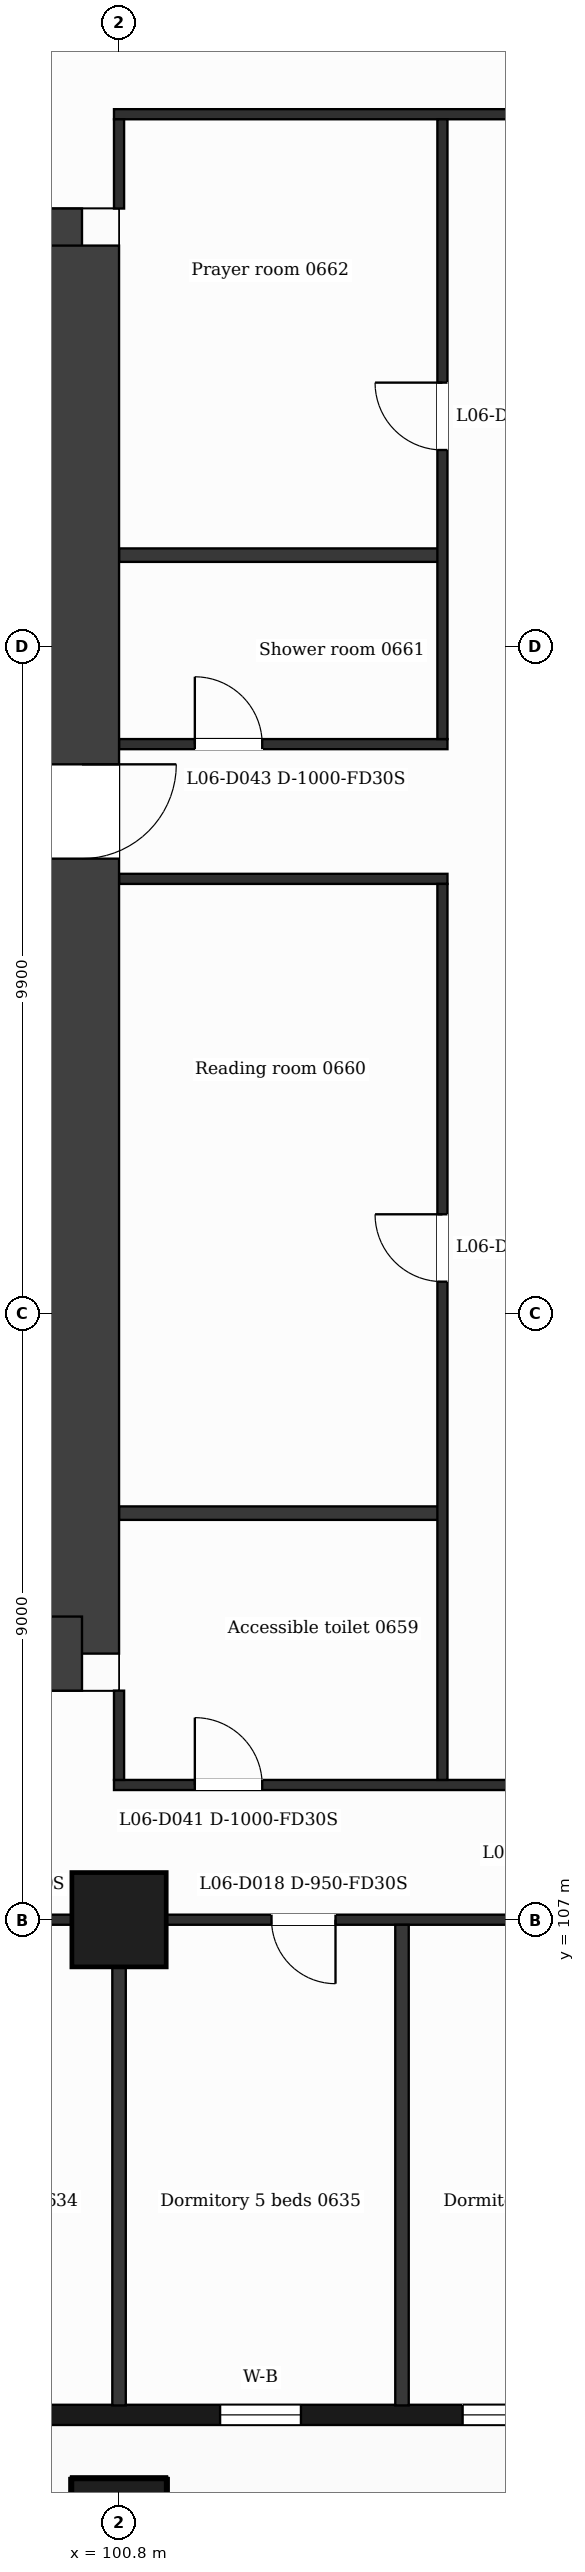
"""IFC4 building model, lengths in metres.
Left out: names, types, materials, properties, quantities, classifications, styles, units other than length and angle.
Written with IfcOpenShell. Run it as: python <this file> out.ifc"""

import sys

from ifc_helpers import new_model, si_unit, direction, frame, frame_2d, origin, origin_2d, place, context, subcontext, project, spatial, rectangle, extrude, element, fill, save


model = new_model("IFC4")
c1 = context("Model", 3, precision=1e-05, world=origin(), true_north=direction((0.0, 1.0)))
c2 = subcontext(c1, "Body", "Model", "MODEL_VIEW")
j1 = project(units=[si_unit("LENGTHUNIT", "METRE"), si_unit("PLANEANGLEUNIT", "RADIAN")], contexts=[c1])
p1 = place(None, origin())
s1 = spatial("IfcSite", under=j1, at=p1, CompositionType="ELEMENT")
p2 = place(p1, origin())
s2 = spatial("IfcBuilding", under=s1, at=p2, CompositionType="ELEMENT")
p3 = place(p2, frame((0.0, 0.0, 39.0)))
s3 = spatial("IfcBuildingStorey", under=s2, at=p3, CompositionType="ELEMENT", Elevation=39.0)
p4 = place(p3, frame((89.112, 131.85, 0.0), z_axis=(0.0, 0.0, 1.0), x_axis=(1.0, 0.0, 0.0)))
e1 = element("IfcWall", 1, at=p4, inside=s3, PredefinedType="SHEAR", context=c2, shape_type="SweptSolid", body=[
    extrude(rectangle(XDim=11.138, YDim=1.1, at=frame_2d((5.569, 0.0))), origin(), (0.0, 0.0, 1.0), 3.5),
])
p5 = place(p4, frame((6.552, 0.0, 0.0)))
e2 = element("IfcOpeningElement", 2, at=p5, cuts=e1, PredefinedType="OPENING", context=c2, shape_type="SweptSolid", body=[
    extrude(rectangle(XDim=1.2, YDim=2.1, at=frame_2d((0.6, 1.05))), frame((0.0, 0.56, 0.0), z_axis=(0.0, -1.0, 0.0), x_axis=(1.0, 0.0, 0.0)), (0.0, 0.0, 1.0), 1.12),
])
p6 = place(p3, frame((100.25, 131.85, 0.0), z_axis=(0.0, 0.0, 1.0), x_axis=(0.0, -1.0, 0.0)))
e3 = element("IfcWall", 3, at=p6, inside=s3, PredefinedType="SHEAR", context=c2, shape_type="SweptSolid", body=[
    extrude(rectangle(XDim=20.9, YDim=1.1, at=frame_2d((10.45, 0.0))), origin(), (0.0, 0.0, 1.0), 3.5),
])
p7 = place(p6, frame((7.7, 0.0, 0.0)))
e4 = element("IfcOpeningElement", 4, at=p7, cuts=e3, PredefinedType="OPENING", context=c2, shape_type="SweptSolid", body=[
    extrude(rectangle(XDim=1.4, YDim=2.1, at=frame_2d((0.7, 1.05))), frame((0.0, 0.56, 0.0), z_axis=(0.0, -1.0, 0.0), x_axis=(1.0, 0.0, 0.0)), (0.0, 0.0, 1.0), 1.12),
])
p8 = place(p3, frame((100.25, 110.95, 0.0), z_axis=(0.0, 0.0, 1.0), x_axis=(-1.0, 0.0, 0.0)))
e5 = element("IfcWall", 5, at=p8, inside=s3, PredefinedType="SHEAR", context=c2, shape_type="SweptSolid", body=[
    extrude(rectangle(XDim=13.952, YDim=1.1, at=frame_2d((6.976, 0.0))), origin(), (0.0, 0.0, 1.0), 3.5),
])
p9 = place(p8, frame((5.748, 0.0, 0.0)))
e6 = element("IfcOpeningElement", 6, at=p9, cuts=e5, PredefinedType="OPENING", context=c2, shape_type="SweptSolid", body=[
    extrude(rectangle(XDim=1.4, YDim=2.1, at=frame_2d((0.7, 1.05))), frame((0.0, 0.56, 0.0), z_axis=(0.0, -1.0, 0.0), x_axis=(1.0, 0.0, 0.0)), (0.0, 0.0, 1.0), 1.12),
])
for number, where, z_axis, x_axis in (
    (7, (100.8, 98.0, -0.32), (0.0, 0.0, 1.0), (1.0, 0.0, 0.0)),
    (8, (100.8, 107.0, -0.32), (0.0, 0.0, 1.0), (1.0, 0.0, 0.0)),
):
    element("IfcColumn", number, at=place(p3, frame(where, z_axis=z_axis, x_axis=x_axis)), inside=s3, PredefinedType="COLUMN", context=c2, shape_type="SweptSolid", body=[
        extrude(rectangle(XDim=1.4, YDim=1.4, at=origin_2d()), origin(), (0.0, 0.0, 1.0), 3.82),
    ])
p10 = place(p3, frame((89.85, 99.65, 0.0), z_axis=(0.0, 0.0, 1.0), x_axis=(1.0, 0.0, 0.0)))
e9 = element("IfcWall", 9, at=p10, inside=s3, PredefinedType="SOLIDWALL", context=c2, shape_type="SweptSolid", body=[
    extrude(rectangle(XDim=47.25, YDim=0.3, at=frame_2d((23.625, 0.0))), origin(), (0.0, 0.0, 1.0), 3.18),
])
p11 = place(p10, frame((0.725, 0.0, 0.9)))
e10 = element("IfcOpeningElement", 10, at=p11, cuts=e9, PredefinedType="OPENING", context=c2, shape_type="SweptSolid", body=[
    extrude(rectangle(XDim=1.2, YDim=2.1, at=frame_2d((0.6, 1.05))), frame((0.0, 0.16, 0.0), z_axis=(0.0, -1.0, 0.0), x_axis=(1.0, 0.0, 0.0)), (0.0, 0.0, 1.0), 0.32),
])
p12 = place(p10, frame((3.45, 0.0, 0.9)))
e11 = element("IfcOpeningElement", 11, at=p12, cuts=e9, PredefinedType="OPENING", context=c2, shape_type="SweptSolid", body=[
    extrude(rectangle(XDim=2.4, YDim=2.1, at=frame_2d((1.2, 1.05))), frame((0.0, 0.16, 0.0), z_axis=(0.0, -1.0, 0.0), x_axis=(1.0, 0.0, 0.0)), (0.0, 0.0, 1.0), 0.32),
])
p13 = place(p10, frame((8.25, 0.0, 0.9)))
e12 = element("IfcOpeningElement", 12, at=p13, cuts=e9, PredefinedType="OPENING", context=c2, shape_type="SweptSolid", body=[
    extrude(rectangle(XDim=1.2, YDim=2.1, at=frame_2d((0.6, 1.05))), frame((0.0, 0.16, 0.0), z_axis=(0.0, -1.0, 0.0), x_axis=(1.0, 0.0, 0.0)), (0.0, 0.0, 1.0), 0.32),
])
p14 = place(p10, frame((12.45, 0.0, 0.9)))
e13 = element("IfcOpeningElement", 13, at=p14, cuts=e9, PredefinedType="OPENING", context=c2, shape_type="SweptSolid", body=[
    extrude(rectangle(XDim=1.2, YDim=2.1, at=frame_2d((0.6, 1.05))), frame((0.0, 0.16, 0.0), z_axis=(0.0, -1.0, 0.0), x_axis=(1.0, 0.0, 0.0)), (0.0, 0.0, 1.0), 0.32),
])
p15 = place(p10, frame((16.05, 0.0, 0.9)))
e14 = element("IfcOpeningElement", 14, at=p15, cuts=e9, PredefinedType="OPENING", context=c2, shape_type="SweptSolid", body=[
    extrude(rectangle(XDim=2.4, YDim=2.1, at=frame_2d((1.2, 1.05))), frame((0.0, 0.16, 0.0), z_axis=(0.0, -1.0, 0.0), x_axis=(1.0, 0.0, 0.0)), (0.0, 0.0, 1.0), 0.32),
])
p16 = place(p10, frame((20.25, 0.0, 0.9)))
e15 = element("IfcOpeningElement", 15, at=p16, cuts=e9, PredefinedType="OPENING", context=c2, shape_type="SweptSolid", body=[
    extrude(rectangle(XDim=2.4, YDim=2.1, at=frame_2d((1.2, 1.05))), frame((0.0, 0.16, 0.0), z_axis=(0.0, -1.0, 0.0), x_axis=(1.0, 0.0, 0.0)), (0.0, 0.0, 1.0), 0.32),
])
p17 = place(p10, frame((25.05, 0.0, 0.0)))
e16 = element("IfcOpeningElement", 16, at=p17, cuts=e9, PredefinedType="OPENING", context=c2, shape_type="SweptSolid", body=[
    extrude(rectangle(XDim=1.2, YDim=2.4, at=frame_2d((0.6, 1.2))), frame((0.0, 0.16, 0.0), z_axis=(0.0, -1.0, 0.0), x_axis=(1.0, 0.0, 0.0)), (0.0, 0.0, 1.0), 0.32),
])
p18 = place(p10, frame((28.65, 0.0, 0.9)))
e17 = element("IfcOpeningElement", 17, at=p18, cuts=e9, PredefinedType="OPENING", context=c2, shape_type="SweptSolid", body=[
    extrude(rectangle(XDim=2.4, YDim=2.1, at=frame_2d((1.2, 1.05))), frame((0.0, 0.16, 0.0), z_axis=(0.0, -1.0, 0.0), x_axis=(1.0, 0.0, 0.0)), (0.0, 0.0, 1.0), 0.32),
])
p19 = place(p10, frame((32.85, 0.0, 0.9)))
e18 = element("IfcOpeningElement", 18, at=p19, cuts=e9, PredefinedType="OPENING", context=c2, shape_type="SweptSolid", body=[
    extrude(rectangle(XDim=2.4, YDim=2.1, at=frame_2d((1.2, 1.05))), frame((0.0, 0.16, 0.0), z_axis=(0.0, -1.0, 0.0), x_axis=(1.0, 0.0, 0.0)), (0.0, 0.0, 1.0), 0.32),
])
p20 = place(p10, frame((37.65, 0.0, 0.9)))
e19 = element("IfcOpeningElement", 19, at=p20, cuts=e9, PredefinedType="OPENING", context=c2, shape_type="SweptSolid", body=[
    extrude(rectangle(XDim=1.2, YDim=2.1, at=frame_2d((0.6, 1.05))), frame((0.0, 0.16, 0.0), z_axis=(0.0, -1.0, 0.0), x_axis=(1.0, 0.0, 0.0)), (0.0, 0.0, 1.0), 0.32),
])
p21 = place(p10, frame((41.85, 0.0, 0.9)))
e20 = element("IfcOpeningElement", 20, at=p21, cuts=e9, PredefinedType="OPENING", context=c2, shape_type="SweptSolid", body=[
    extrude(rectangle(XDim=1.2, YDim=2.1, at=frame_2d((0.6, 1.05))), frame((0.0, 0.16, 0.0), z_axis=(0.0, -1.0, 0.0), x_axis=(1.0, 0.0, 0.0)), (0.0, 0.0, 1.0), 0.32),
])
p22 = place(p10, frame((45.25, 0.0, 0.9)))
e21 = element("IfcOpeningElement", 21, at=p22, cuts=e9, PredefinedType="OPENING", context=c2, shape_type="SweptSolid", body=[
    extrude(rectangle(XDim=1.2, YDim=2.1, at=frame_2d((0.6, 1.05))), frame((0.0, 0.16, 0.0), z_axis=(0.0, -1.0, 0.0), x_axis=(1.0, 0.0, 0.0)), (0.0, 0.0, 1.0), 0.32),
])
p23 = place(p3, frame((87.018, 107.0, 0.0), z_axis=(0.0, 0.0, 1.0), x_axis=(1.0, 0.0, 0.0)))
e22 = element("IfcWall", 22, at=p23, inside=s3, PredefinedType="PARTITIONING", context=c2, shape_type="SweptSolid", body=[
    extrude(rectangle(XDim=52.765, YDim=0.15, at=frame_2d((26.382, 0.0))), origin(), (0.0, 0.0, 1.0), 3.18),
])
p24 = place(p23, frame((1.032, 0.0, 0.0)))
e23 = element("IfcOpeningElement", 23, at=p24, cuts=e22, PredefinedType="OPENING", context=c2, shape_type="SweptSolid", body=[
    extrude(rectangle(XDim=0.95, YDim=2.1, at=frame_2d((0.475, 1.05))), frame((0.0, 0.085, 0.0), z_axis=(0.0, -1.0, 0.0), x_axis=(1.0, 0.0, 0.0)), (0.0, 0.0, 1.0), 0.17),
])
p25 = place(p23, frame((6.369, 0.0, 0.0)))
e24 = element("IfcOpeningElement", 24, at=p25, cuts=e22, PredefinedType="OPENING", context=c2, shape_type="SweptSolid", body=[
    extrude(rectangle(XDim=0.95, YDim=2.1, at=frame_2d((0.475, 1.05))), frame((0.0, 0.085, 0.0), z_axis=(0.0, -1.0, 0.0), x_axis=(1.0, 0.0, 0.0)), (0.0, 0.0, 1.0), 0.17),
])
p26 = place(p23, frame((10.952, 0.0, 0.0)))
e25 = element("IfcOpeningElement", 25, at=p26, cuts=e22, PredefinedType="OPENING", context=c2, shape_type="SweptSolid", body=[
    extrude(rectangle(XDim=0.95, YDim=2.1, at=frame_2d((0.475, 1.05))), frame((0.0, 0.085, 0.0), z_axis=(0.0, -1.0, 0.0), x_axis=(1.0, 0.0, 0.0)), (0.0, 0.0, 1.0), 0.17),
])
p27 = place(p23, frame((16.045, 0.0, 0.0)))
e26 = element("IfcOpeningElement", 26, at=p27, cuts=e22, PredefinedType="OPENING", context=c2, shape_type="SweptSolid", body=[
    extrude(rectangle(XDim=0.95, YDim=2.1, at=frame_2d((0.475, 1.05))), frame((0.0, 0.085, 0.0), z_axis=(0.0, -1.0, 0.0), x_axis=(1.0, 0.0, 0.0)), (0.0, 0.0, 1.0), 0.17),
])
p28 = place(p23, frame((20.245, 0.0, 0.0)))
e27 = element("IfcOpeningElement", 27, at=p28, cuts=e22, PredefinedType="OPENING", context=c2, shape_type="SweptSolid", body=[
    extrude(rectangle(XDim=0.95, YDim=2.1, at=frame_2d((0.475, 1.05))), frame((0.0, 0.085, 0.0), z_axis=(0.0, -1.0, 0.0), x_axis=(1.0, 0.0, 0.0)), (0.0, 0.0, 1.0), 0.17),
])
p29 = place(p23, frame((24.969, 0.0, 0.0)))
e28 = element("IfcOpeningElement", 28, at=p29, cuts=e22, PredefinedType="OPENING", context=c2, shape_type="SweptSolid", body=[
    extrude(rectangle(XDim=0.95, YDim=2.1, at=frame_2d((0.475, 1.05))), frame((0.0, 0.085, 0.0), z_axis=(0.0, -1.0, 0.0), x_axis=(1.0, 0.0, 0.0)), (0.0, 0.0, 1.0), 0.17),
])
p30 = place(p23, frame((26.807, 0.0, 0.0)))
e29 = element("IfcOpeningElement", 29, at=p30, cuts=e22, PredefinedType="OPENING", context=c2, shape_type="SweptSolid", body=[
    extrude(rectangle(XDim=0.95, YDim=2.1, at=frame_2d((0.475, 1.05))), frame((0.0, 0.085, 0.0), z_axis=(0.0, -1.0, 0.0), x_axis=(1.0, 0.0, 0.0)), (0.0, 0.0, 1.0), 0.17),
])
p31 = place(p23, frame((31.952, 0.0, 0.0)))
e30 = element("IfcOpeningElement", 30, at=p31, cuts=e22, PredefinedType="OPENING", context=c2, shape_type="SweptSolid", body=[
    extrude(rectangle(XDim=0.95, YDim=2.1, at=frame_2d((0.475, 1.05))), frame((0.0, 0.085, 0.0), z_axis=(0.0, -1.0, 0.0), x_axis=(1.0, 0.0, 0.0)), (0.0, 0.0, 1.0), 0.17),
])
p32 = place(p23, frame((40.795, 0.0, 0.0)))
e31 = element("IfcOpeningElement", 31, at=p32, cuts=e22, PredefinedType="OPENING", context=c2, shape_type="SweptSolid", body=[
    extrude(rectangle(XDim=0.95, YDim=2.1, at=frame_2d((0.475, 1.05))), frame((0.0, 0.085, 0.0), z_axis=(0.0, -1.0, 0.0), x_axis=(1.0, 0.0, 0.0)), (0.0, 0.0, 1.0), 0.17),
])
p33 = place(p23, frame((43.644, 0.0, 0.0)))
e32 = element("IfcOpeningElement", 32, at=p33, cuts=e22, PredefinedType="OPENING", context=c2, shape_type="SweptSolid", body=[
    extrude(rectangle(XDim=0.95, YDim=2.1, at=frame_2d((0.475, 1.05))), frame((0.0, 0.085, 0.0), z_axis=(0.0, -1.0, 0.0), x_axis=(1.0, 0.0, 0.0)), (0.0, 0.0, 1.0), 0.17),
])
p34 = place(p23, frame((48.767, 0.0, 0.0)))
e33 = element("IfcOpeningElement", 33, at=p34, cuts=e22, PredefinedType="OPENING", context=c2, shape_type="SweptSolid", body=[
    extrude(rectangle(XDim=0.95, YDim=2.1, at=frame_2d((0.475, 1.05))), frame((0.0, 0.085, 0.0), z_axis=(0.0, -1.0, 0.0), x_axis=(1.0, 0.0, 0.0)), (0.0, 0.0, 1.0), 0.17),
])
p35 = place(p3, frame((100.725, 109.0, 0.0), z_axis=(0.0, 0.0, 1.0), x_axis=(1.0, 0.0, 0.0)))
e34 = element("IfcWall", 34, at=p35, inside=s3, PredefinedType="PARTITIONING", context=c2, shape_type="SweptSolid", body=[
    extrude(rectangle(XDim=25.35, YDim=0.15, at=frame_2d((12.675, 0.0))), origin(), (0.0, 0.0, 1.0), 3.18),
])
p36 = place(p35, frame((1.2, 0.0, 0.0)))
e35 = element("IfcOpeningElement", 35, at=p36, cuts=e34, PredefinedType="OPENING", context=c2, shape_type="SweptSolid", body=[
    extrude(rectangle(XDim=1.0, YDim=2.1, at=frame_2d((0.5, 1.05))), frame((0.0, 0.085, 0.0), z_axis=(0.0, -1.0, 0.0), x_axis=(1.0, 0.0, 0.0)), (0.0, 0.0, 1.0), 0.17),
])
p37 = place(p35, frame((12.845, 0.0, 0.0)))
e36 = element("IfcOpeningElement", 36, at=p37, cuts=e34, PredefinedType="OPENING", context=c2, shape_type="SweptSolid", body=[
    extrude(rectangle(XDim=1.0, YDim=2.1, at=frame_2d((0.5, 1.05))), frame((0.0, 0.085, 0.0), z_axis=(0.0, -1.0, 0.0), x_axis=(1.0, 0.0, 0.0)), (0.0, 0.0, 1.0), 0.17),
])
p38 = place(p35, frame((23.15, 0.0, 0.0)))
e37 = element("IfcOpeningElement", 37, at=p38, cuts=e34, PredefinedType="OPENING", context=c2, shape_type="SweptSolid", body=[
    extrude(rectangle(XDim=1.0, YDim=2.1, at=frame_2d((0.5, 1.05))), frame((0.0, 0.085, 0.0), z_axis=(0.0, -1.0, 0.0), x_axis=(1.0, 0.0, 0.0)), (0.0, 0.0, 1.0), 0.17),
])
p39 = place(p3, frame((100.8, 113.035, 0.0), z_axis=(0.0, 0.0, 1.0), x_axis=(1.0, 0.0, 0.0)))
e38 = element("IfcWall", 38, at=p39, inside=s3, PredefinedType="PARTITIONING", context=c2, shape_type="SweptSolid", body=[
    extrude(rectangle(XDim=4.8, YDim=0.2, at=frame_2d((2.4, 0.0))), origin(), (0.0, 0.0, 1.0), 3.18),
])
p40 = place(p3, frame((100.8, 122.45, 0.0), z_axis=(0.0, 0.0, 1.0), x_axis=(1.0, 0.0, 0.0)))
e39 = element("IfcWall", 39, at=p40, inside=s3, PredefinedType="PARTITIONING", context=c2, shape_type="SweptSolid", body=[
    extrude(rectangle(XDim=4.875, YDim=0.15, at=frame_2d((2.438, 0.0))), origin(), (0.0, 0.0, 1.0), 3.18),
])
p41 = place(p3, frame((100.8, 124.45, 0.0), z_axis=(0.0, 0.0, 1.0), x_axis=(1.0, 0.0, 0.0)))
e40 = element("IfcWall", 40, at=p41, inside=s3, PredefinedType="PARTITIONING", context=c2, shape_type="SweptSolid", body=[
    extrude(rectangle(XDim=4.875, YDim=0.15, at=frame_2d((2.438, 0.0))), origin(), (0.0, 0.0, 1.0), 3.18),
])
p42 = place(p41, frame((1.125, 0.0, 0.0)))
e41 = element("IfcOpeningElement", 41, at=p42, cuts=e40, PredefinedType="OPENING", context=c2, shape_type="SweptSolid", body=[
    extrude(rectangle(XDim=1.0, YDim=2.1, at=frame_2d((0.5, 1.05))), frame((0.0, 0.085, 0.0), z_axis=(0.0, -1.0, 0.0), x_axis=(1.0, 0.0, 0.0)), (0.0, 0.0, 1.0), 0.17),
])
p43 = place(p3, frame((100.8, 127.255, 0.0), z_axis=(0.0, 0.0, 1.0), x_axis=(1.0, 0.0, 0.0)))
e42 = element("IfcWall", 42, at=p43, inside=s3, PredefinedType="PARTITIONING", context=c2, shape_type="SweptSolid", body=[
    extrude(rectangle(XDim=4.8, YDim=0.2, at=frame_2d((2.4, 0.0))), origin(), (0.0, 0.0, 1.0), 3.18),
])
p44 = place(p3, frame((100.725, 133.8, 0.0), z_axis=(0.0, 0.0, 1.0), x_axis=(1.0, 0.0, 0.0)))
e43 = element("IfcWall", 43, at=p44, inside=s3, PredefinedType="PARTITIONING", context=c2, shape_type="SweptSolid", body=[
    extrude(rectangle(XDim=25.35, YDim=0.15, at=frame_2d((12.675, 0.0))), origin(), (0.0, 0.0, 1.0), 3.18),
])
p45 = place(p3, frame((100.8, 99.79, 0.0), z_axis=(0.0, 0.0, 1.0), x_axis=(0.0, 1.0, 0.0)))
e44 = element("IfcWall", 44, at=p45, inside=s3, PredefinedType="PARTITIONING", context=c2, shape_type="SweptSolid", body=[
    extrude(rectangle(XDim=7.135, YDim=0.2, at=frame_2d((3.567, 0.0))), origin(), (0.0, 0.0, 1.0), 3.18),
])
p46 = place(p3, frame((100.8, 109.075, 0.0), z_axis=(0.0, 0.0, 1.0), x_axis=(0.0, 1.0, 0.0)))
e45 = element("IfcWall", 45, at=p46, inside=s3, PredefinedType="PARTITIONING", context=c2, shape_type="SweptSolid", body=[
    extrude(rectangle(XDim=1.325, YDim=0.15, at=frame_2d((0.663, 0.0))), origin(), (0.0, 0.0, 1.0), 3.18),
])
p47 = place(p3, frame((100.8, 132.4, 0.0), z_axis=(0.0, 0.0, 1.0), x_axis=(0.0, 1.0, 0.0)))
e46 = element("IfcWall", 46, at=p47, inside=s3, PredefinedType="PARTITIONING", context=c2, shape_type="SweptSolid", body=[
    extrude(rectangle(XDim=1.325, YDim=0.15, at=frame_2d((0.663, 0.0))), origin(), (0.0, 0.0, 1.0), 3.18),
])
p48 = place(p3, frame((105.0, 99.79, 0.0), z_axis=(0.0, 0.0, 1.0), x_axis=(0.0, 1.0, 0.0)))
e47 = element("IfcWall", 47, at=p48, inside=s3, PredefinedType="PARTITIONING", context=c2, shape_type="SweptSolid", body=[
    extrude(rectangle(XDim=7.135, YDim=0.2, at=frame_2d((3.567, 0.0))), origin(), (0.0, 0.0, 1.0), 3.18),
])
p49 = place(p3, frame((105.6, 109.075, 0.0), z_axis=(0.0, 0.0, 1.0), x_axis=(0.0, 1.0, 0.0)))
e48 = element("IfcWall", 48, at=p49, inside=s3, PredefinedType="PARTITIONING", context=c2, shape_type="SweptSolid", body=[
    extrude(rectangle(XDim=13.3, YDim=0.15, at=frame_2d((6.65, 0.0))), origin(), (0.0, 0.0, 1.0), 3.18),
])
p50 = place(p49, frame((7.396, 0.0, 0.0)))
e49 = element("IfcOpeningElement", 49, at=p50, cuts=e48, PredefinedType="OPENING", context=c2, shape_type="SweptSolid", body=[
    extrude(rectangle(XDim=1.0, YDim=2.1, at=frame_2d((0.5, 1.05))), frame((0.0, 0.085, 0.0), z_axis=(0.0, -1.0, 0.0), x_axis=(1.0, 0.0, 0.0)), (0.0, 0.0, 1.0), 0.17),
])
p51 = place(p3, frame((105.6, 124.525, 0.0), z_axis=(0.0, 0.0, 1.0), x_axis=(0.0, 1.0, 0.0)))
e50 = element("IfcWall", 50, at=p51, inside=s3, PredefinedType="PARTITIONING", context=c2, shape_type="SweptSolid", body=[
    extrude(rectangle(XDim=9.2, YDim=0.15, at=frame_2d((4.6, 0.0))), origin(), (0.0, 0.0, 1.0), 3.18),
])
p52 = place(p51, frame((4.291, 0.0, 0.0)))
e51 = element("IfcOpeningElement", 51, at=p52, cuts=e50, PredefinedType="OPENING", context=c2, shape_type="SweptSolid", body=[
    extrude(rectangle(XDim=1.0, YDim=2.1, at=frame_2d((0.5, 1.05))), frame((0.0, 0.085, 0.0), z_axis=(0.0, -1.0, 0.0), x_axis=(1.0, 0.0, 0.0)), (0.0, 0.0, 1.0), 0.17),
])
p53 = place(p14, origin())
e52 = element("IfcWindow", 52, at=p53, inside=s3, PartitioningType="SINGLE_PANEL", PredefinedType="WINDOW", context=c2, shape_type="SweptSolid", body=[
    extrude(rectangle(XDim=1.2, YDim=2.1, at=frame_2d((0.6, 1.05))), frame((0.0, 0.03, 0.0), z_axis=(0.0, -1.0, 0.0), x_axis=(1.0, 0.0, 0.0)), (0.0, 0.0, 1.0), 0.06),
])
fill(e13, e52)
p54 = place(p15, origin())
e53 = element("IfcWindow", 53, at=p54, inside=s3, PartitioningType="SINGLE_PANEL", PredefinedType="WINDOW", context=c2, shape_type="SweptSolid", body=[
    extrude(rectangle(XDim=2.4, YDim=2.1, at=frame_2d((1.2, 1.05))), frame((0.0, 0.03, 0.0), z_axis=(0.0, -1.0, 0.0), x_axis=(1.0, 0.0, 0.0)), (0.0, 0.0, 1.0), 0.06),
])
fill(e14, e53)
p55 = place(p27, origin())
e54 = element("IfcDoor", 54, at=p55, inside=s3, OperationType="SINGLE_SWING_RIGHT", PredefinedType="DOOR", context=c2, shape_type="SweptSolid", body=[
    extrude(rectangle(XDim=0.95, YDim=2.1, at=frame_2d((0.475, 1.05))), frame((0.0, 0.025, 0.0), z_axis=(0.0, -1.0, 0.0), x_axis=(1.0, 0.0, 0.0)), (0.0, 0.0, 1.0), 0.05),
])
fill(e26, e54)
p56 = place(p36, origin())
e55 = element("IfcDoor", 55, at=p56, inside=s3, OperationType="SINGLE_SWING_LEFT", PredefinedType="DOOR", context=c2, shape_type="SweptSolid", body=[
    extrude(rectangle(XDim=1.0, YDim=2.1, at=frame_2d((0.5, 1.05))), frame((0.0, 0.025, 0.0), z_axis=(0.0, -1.0, 0.0), x_axis=(1.0, 0.0, 0.0)), (0.0, 0.0, 1.0), 0.05),
])
fill(e35, e55)
p57 = place(p50, origin())
e56 = element("IfcDoor", 56, at=p57, inside=s3, OperationType="SINGLE_SWING_RIGHT", PredefinedType="DOOR", context=c2, shape_type="SweptSolid", body=[
    extrude(rectangle(XDim=1.0, YDim=2.1, at=frame_2d((0.5, 1.05))), frame((0.0, 0.025, 0.0), z_axis=(0.0, -1.0, 0.0), x_axis=(1.0, 0.0, 0.0)), (0.0, 0.0, 1.0), 0.05),
])
fill(e49, e56)
p58 = place(p42, origin())
e57 = element("IfcDoor", 57, at=p58, inside=s3, OperationType="SINGLE_SWING_LEFT", PredefinedType="DOOR", context=c2, shape_type="SweptSolid", body=[
    extrude(rectangle(XDim=1.0, YDim=2.1, at=frame_2d((0.5, 1.05))), frame((0.0, 0.025, 0.0), z_axis=(0.0, -1.0, 0.0), x_axis=(1.0, 0.0, 0.0)), (0.0, 0.0, 1.0), 0.05),
])
fill(e41, e57)
p59 = place(p52, origin())
e58 = element("IfcDoor", 58, at=p59, inside=s3, OperationType="SINGLE_SWING_RIGHT", PredefinedType="DOOR", context=c2, shape_type="SweptSolid", body=[
    extrude(rectangle(XDim=1.0, YDim=2.1, at=frame_2d((0.5, 1.05))), frame((0.0, 0.025, 0.0), z_axis=(0.0, -1.0, 0.0), x_axis=(1.0, 0.0, 0.0)), (0.0, 0.0, 1.0), 0.05),
])
fill(e51, e58)
p60 = place(p7, origin())
e59 = element("IfcDoor", 59, at=p60, inside=s3, OperationType="SINGLE_SWING_LEFT", PredefinedType="DOOR", context=c2, shape_type="SweptSolid", body=[
    extrude(rectangle(XDim=1.4, YDim=2.1, at=frame_2d((0.7, 1.05))), frame((0.0, 0.025, 0.0), z_axis=(0.0, -1.0, 0.0), x_axis=(1.0, 0.0, 0.0)), (0.0, 0.0, 1.0), 0.05),
])
fill(e4, e59)
save(model, sys.argv[1])
